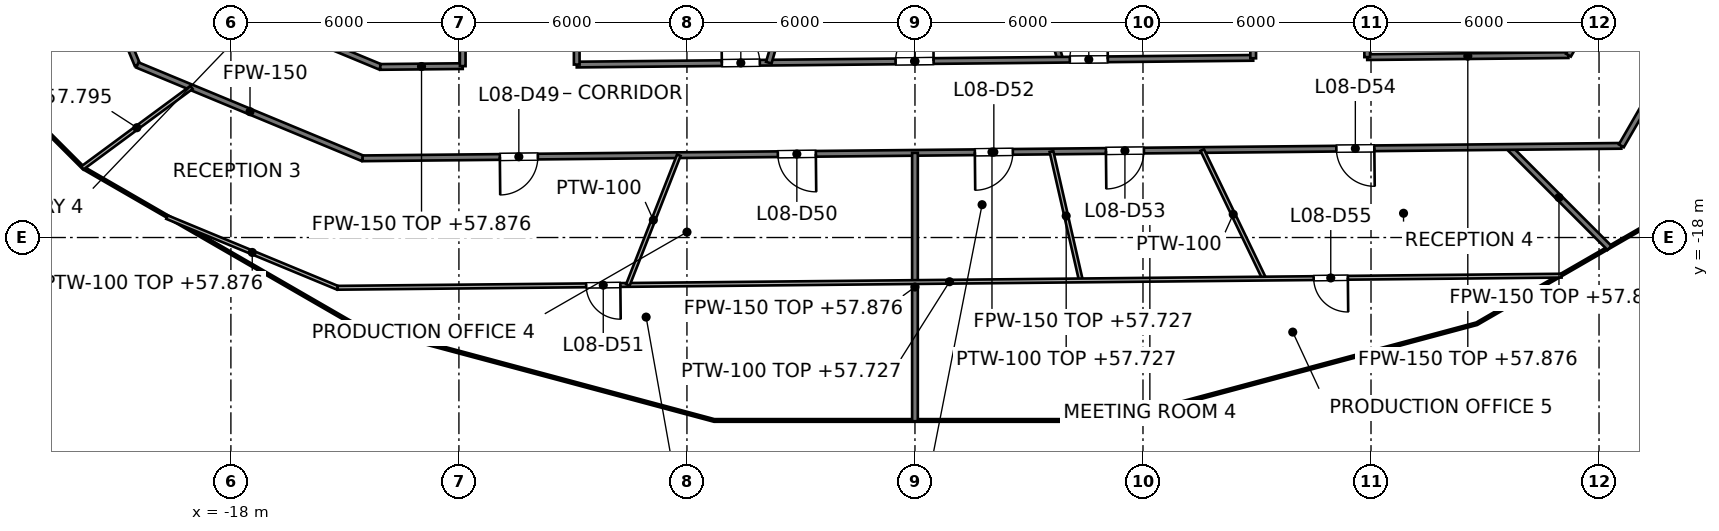
"""IFC4 building model, lengths in metres.
Left out: names, types, materials, properties, quantities, classifications, styles, units other than length and angle.
Written with IfcOpenShell. Run it as: python <this file> out.ifc"""

import sys

from ifc_helpers import new_model, si_unit, direction, frame, frame_2d, origin, place, context, subcontext, project, spatial, rectangle, extrude, element, fill, save


model = new_model("IFC4")
c1 = context("Model", 3, precision=1e-05, world=origin(), true_north=direction((0.0, 1.0)))
c2 = subcontext(c1, "Body", "Model", "MODEL_VIEW")
j1 = project(units=[si_unit("LENGTHUNIT", "METRE"), si_unit("PLANEANGLEUNIT", "RADIAN")], contexts=[c1])
p1 = place(None, origin())
s1 = spatial("IfcSite", under=j1, at=p1, CompositionType="ELEMENT")
p2 = place(p1, origin())
s2 = spatial("IfcBuilding", under=s1, at=p2, CompositionType="ELEMENT")
p3 = place(p2, frame((0.0, 0.0, 54.6)))
s3 = spatial("IfcBuildingStorey", under=s2, at=p3, CompositionType="ELEMENT", Elevation=54.6)
p4 = place(p3, frame((2.296, -8.0, 0.0), z_axis=(0.0, 0.0, 1.0), x_axis=(0.275935525478, -0.961176147113, 0.0)))
e1 = element("IfcWall", 1, at=p4, inside=s3, PredefinedType="PARTITIONING", context=c2, shape_type="SweptSolid", body=[
    extrude(rectangle(XDim=5.548, YDim=0.15, at=frame_2d((2.774, 0.0))), origin(), (0.0, 0.0, 1.0), 4.05),
])
p5 = place(p3, frame((-22.9, -7.572, 0.0), z_axis=(0.0, 0.0, 1.0), x_axis=(0.382860357704, -0.923806227788, 0.0)))
e2 = element("IfcWall", 2, at=p5, inside=s3, PredefinedType="PARTITIONING", context=c2, shape_type="SweptSolid", body=[
    extrude(rectangle(XDim=6.374, YDim=0.15, at=frame_2d((3.187, 0.0))), origin(), (0.0, 0.0, 1.0), 3.276),
])
p6 = place(p5, frame((2.637, 0.0, 0.0)))
e3 = element("IfcOpeningElement", 3, at=p6, cuts=e2, PredefinedType="OPENING", context=c2, shape_type="SweptSolid", body=[
    extrude(rectangle(XDim=1.0, YDim=2.1, at=frame_2d((0.5, 1.05))), frame((0.0, 0.075, 0.0), z_axis=(0.0, -1.0, 0.0), x_axis=(1.0, 0.0, 0.0)), (0.0, 0.0, 1.0), 0.15),
])
p7 = place(p3, frame((15.617, -15.617, 0.0), z_axis=(0.0, 0.0, 1.0), x_axis=(0.707106781187, -0.707106781187, 0.0)))
e4 = element("IfcWall", 4, at=p7, inside=s3, PredefinedType="PARTITIONING", context=c2, shape_type="SweptSolid", body=[
    extrude(rectangle(XDim=3.759, YDim=0.15, at=frame_2d((1.879, 0.0))), origin(), (0.0, 0.0, 1.0), 3.276),
])
p8 = place(p3, frame((-20.46, -13.46, 0.0), z_axis=(0.0, 0.0, 1.0), x_axis=(0.9237825057, -0.382917591869, 0.0)))
e5 = element("IfcWall", 5, at=p8, inside=s3, PredefinedType="PARTITIONING", context=c2, shape_type="SweptSolid", body=[
    extrude(rectangle(XDim=6.415, YDim=0.15, at=frame_2d((3.208, 0.0))), origin(), (0.0, 0.0, 1.0), 3.195),
])
p9 = place(p3, frame((-18.623, -11.623, 0.0), z_axis=(0.0, 0.0, 1.0), x_axis=(0.923791670587, -0.38289548098, 0.0)))
e6 = element("IfcWall", 6, at=p9, inside=s3, PredefinedType="PARTITIONING", context=c2, shape_type="SweptSolid", body=[
    extrude(rectangle(XDim=4.931, YDim=0.15, at=frame_2d((2.465, 0.0))), origin(), (0.0, 0.0, 1.0), 3.195),
])
p10 = place(p3, frame((-14.534, -15.916, 0.0), z_axis=(0.0, 0.0, 1.0), x_axis=(0.99995085722, 0.009913785652, 0.0)))
e7 = element("IfcWall", 7, at=p10, inside=s3, PredefinedType="PARTITIONING", context=c2, shape_type="SweptSolid", body=[
    extrude(rectangle(XDim=33.123, YDim=0.15, at=frame_2d((16.561, 0.0))), origin(), (0.0, 0.0, 1.0), 3.127),
])
p11 = place(p10, frame((3.611, 0.0, 0.0)))
e8 = element("IfcOpeningElement", 8, at=p11, cuts=e7, PredefinedType="OPENING", context=c2, shape_type="SweptSolid", body=[
    extrude(rectangle(XDim=1.0, YDim=2.1, at=frame_2d((0.5, 1.05))), frame((0.0, 0.075, 0.0), z_axis=(0.0, -1.0, 0.0), x_axis=(1.0, 0.0, 0.0)), (0.0, 0.0, 1.0), 0.15),
])
p12 = place(p10, frame((10.927, 0.0, 0.0)))
e9 = element("IfcOpeningElement", 9, at=p12, cuts=e7, PredefinedType="OPENING", context=c2, shape_type="SweptSolid", body=[
    extrude(rectangle(XDim=1.0, YDim=2.1, at=frame_2d((0.5, 1.05))), frame((0.0, 0.075, 0.0), z_axis=(0.0, -1.0, 0.0), x_axis=(1.0, 0.0, 0.0)), (0.0, 0.0, 1.0), 0.15),
])
p13 = place(p10, frame((16.11, 0.0, 0.0)))
e10 = element("IfcOpeningElement", 10, at=p13, cuts=e7, PredefinedType="OPENING", context=c2, shape_type="SweptSolid", body=[
    extrude(rectangle(XDim=1.0, YDim=2.1, at=frame_2d((0.5, 1.05))), frame((0.0, 0.075, 0.0), z_axis=(0.0, -1.0, 0.0), x_axis=(1.0, 0.0, 0.0)), (0.0, 0.0, 1.0), 0.15),
])
p14 = place(p10, frame((19.56, 0.0, 0.0)))
e11 = element("IfcOpeningElement", 11, at=p14, cuts=e7, PredefinedType="OPENING", context=c2, shape_type="SweptSolid", body=[
    extrude(rectangle(XDim=1.0, YDim=2.1, at=frame_2d((0.5, 1.05))), frame((0.0, 0.075, 0.0), z_axis=(0.0, -1.0, 0.0), x_axis=(1.0, 0.0, 0.0)), (0.0, 0.0, 1.0), 0.15),
])
p15 = place(p10, frame((25.623, 0.0, 0.0)))
e12 = element("IfcOpeningElement", 12, at=p15, cuts=e7, PredefinedType="OPENING", context=c2, shape_type="SweptSolid", body=[
    extrude(rectangle(XDim=1.0, YDim=2.1, at=frame_2d((0.5, 1.05))), frame((0.0, 0.075, 0.0), z_axis=(0.0, -1.0, 0.0), x_axis=(1.0, 0.0, 0.0)), (0.0, 0.0, 1.0), 0.15),
])
p16 = place(p3, frame((-14.068, -13.511, 0.0), z_axis=(0.0, 0.0, 1.0), x_axis=(0.999950911515, 0.009908307647, 0.0)))
e13 = element("IfcWall", 13, at=p16, inside=s3, PredefinedType="PARTITIONING", context=c2, shape_type="SweptSolid", body=[
    extrude(rectangle(XDim=2.168, YDim=0.15, at=frame_2d((1.084, 0.0))), origin(), (0.0, 0.0, 1.0), 3.276),
])
p17 = place(p3, frame((-8.9, -13.449, 0.0), z_axis=(0.0, 0.0, 1.0), x_axis=(0.999950834077, 0.009916119672, 0.0)))
e14 = element("IfcWall", 14, at=p17, inside=s3, PredefinedType="PARTITIONING", context=c2, shape_type="SweptSolid", body=[
    extrude(rectangle(XDim=17.801, YDim=0.15, at=frame_2d((8.9, 0.0))), origin(), (0.0, 0.0, 1.0), 3.127),
])
p18 = place(p17, frame((3.818, 0.0, 0.0)))
e15 = element("IfcOpeningElement", 15, at=p18, cuts=e14, PredefinedType="OPENING", context=c2, shape_type="SweptSolid", body=[
    extrude(rectangle(XDim=1.0, YDim=2.1, at=frame_2d((0.5, 1.05))), frame((0.0, 0.075, 0.0), z_axis=(0.0, -1.0, 0.0), x_axis=(1.0, 0.0, 0.0)), (0.0, 0.0, 1.0), 0.15),
])
p19 = place(p17, frame((8.391, 0.0, 0.0)))
e16 = element("IfcOpeningElement", 16, at=p19, cuts=e14, PredefinedType="OPENING", context=c2, shape_type="SweptSolid", body=[
    extrude(rectangle(XDim=1.0, YDim=2.1, at=frame_2d((0.5, 1.05))), frame((0.0, 0.075, 0.0), z_axis=(0.0, -1.0, 0.0), x_axis=(1.0, 0.0, 0.0)), (0.0, 0.0, 1.0), 0.15),
])
p20 = place(p17, frame((12.975, 0.0, 0.0)))
e17 = element("IfcOpeningElement", 17, at=p20, cuts=e14, PredefinedType="OPENING", context=c2, shape_type="SweptSolid", body=[
    extrude(rectangle(XDim=1.0, YDim=2.1, at=frame_2d((0.5, 1.05))), frame((0.0, 0.075, 0.0), z_axis=(0.0, -1.0, 0.0), x_axis=(1.0, 0.0, 0.0)), (0.0, 0.0, 1.0), 0.15),
])
p21 = place(p3, frame((11.9, -13.253, 0.0), z_axis=(0.0, 0.0, 1.0), x_axis=(0.999950853109, 0.009914200296, 0.0)))
e18 = element("IfcWall", 18, at=p21, inside=s3, PredefinedType="PARTITIONING", context=c2, shape_type="SweptSolid", body=[
    extrude(rectangle(XDim=5.294, YDim=0.15, at=frame_2d((2.647, 0.0))), origin(), (0.0, 0.0, 1.0), 3.276),
])
p22 = place(p3, frame((18.587, -15.587, 0.0), z_axis=(0.0, 0.0, 1.0), x_axis=(0.500026433136, 0.866010142069, 0.0)))
e19 = element("IfcWall", 19, at=p22, inside=s3, PredefinedType="PARTITIONING", context=c2, shape_type="SweptSolid", body=[
    extrude(rectangle(XDim=8.713, YDim=0.15, at=frame_2d((4.357, 0.0))), origin(), (0.0, 0.0, 1.0), 3.195),
])
p23 = place(p22, frame((3.125, 0.0, 0.0)))
e20 = element("IfcOpeningElement", 20, at=p23, cuts=e19, PredefinedType="OPENING", context=c2, shape_type="SweptSolid", body=[
    extrude(rectangle(XDim=1.0, YDim=2.1, at=frame_2d((0.5, 1.05))), frame((0.0, 0.075, 0.0), z_axis=(0.0, -1.0, 0.0), x_axis=(1.0, 0.0, 0.0)), (0.0, 0.0, 1.0), 0.15),
])
p24 = place(p3, frame((17.194, -13.201, 0.0), z_axis=(0.0, 0.0, 1.0), x_axis=(0.50001062018, 0.866019272134, 0.0)))
e21 = element("IfcWall", 21, at=p24, inside=s3, PredefinedType="PARTITIONING", context=c2, shape_type="SweptSolid", body=[
    extrude(rectangle(XDim=6.674, YDim=0.15, at=frame_2d((3.337, 0.0))), origin(), (0.0, 0.0, 1.0), 3.195),
])
p25 = place(p24, frame((2.833, 0.0, 0.0)))
e22 = element("IfcOpeningElement", 22, at=p25, cuts=e21, PredefinedType="OPENING", context=c2, shape_type="SweptSolid", body=[
    extrude(rectangle(XDim=1.0, YDim=2.1, at=frame_2d((0.5, 1.05))), frame((0.0, 0.075, 0.0), z_axis=(0.0, -1.0, 0.0), x_axis=(1.0, 0.0, 0.0)), (0.0, 0.0, 1.0), 0.15),
])
p26 = place(p3, frame((-3.846, -13.399, 0.0), z_axis=(0.0, 0.0, 1.0), x_axis=(0.275914969745, 0.961182048038, 0.0)))
e23 = element("IfcWall", 23, at=p26, inside=s3, PredefinedType="PARTITIONING", context=c2, shape_type="SweptSolid", body=[
    extrude(rectangle(XDim=5.617, YDim=0.15, at=frame_2d((2.809, 0.0))), origin(), (0.0, 0.0, 1.0), 4.05),
])
p27 = place(p3, frame((11.9, -13.253, 0.0), z_axis=(0.0, 0.0, 1.0), x_axis=(0.0, 1.0, 0.0)))
e24 = element("IfcWall", 24, at=p27, inside=s3, PredefinedType="PARTITIONING", context=c2, shape_type="SweptSolid", body=[
    extrude(rectangle(XDim=5.253, YDim=0.15, at=frame_2d((2.626, 0.0))), origin(), (0.0, 0.0, 1.0), 3.195),
])
p28 = place(p3, frame((8.9, -13.283, 0.0), z_axis=(0.0, 0.0, 1.0), x_axis=(0.0, 1.0, 0.0)))
e25 = element("IfcWall", 25, at=p28, inside=s3, PredefinedType="PARTITIONING", context=c2, shape_type="SweptSolid", body=[
    extrude(rectangle(XDim=5.283, YDim=0.15, at=frame_2d((2.642, 0.0))), origin(), (0.0, 0.0, 1.0), 3.127),
])
p29 = place(p3, frame((0.0, -22.834, 0.0), z_axis=(0.0, 0.0, 1.0), x_axis=(0.0, 1.0, 0.0)))
e26 = element("IfcWall", 26, at=p29, inside=s3, PredefinedType="PARTITIONING", context=c2, shape_type="SweptSolid", body=[
    extrude(rectangle(XDim=7.062, YDim=0.15, at=frame_2d((3.531, 0.0))), origin(), (0.0, 0.0, 1.0), 3.276),
])
p30 = place(p3, frame((-8.9, -13.449, 0.0), z_axis=(0.0, 0.0, 1.0), x_axis=(0.0, 1.0, 0.0)))
e27 = element("IfcWall", 27, at=p30, inside=s3, PredefinedType="PARTITIONING", context=c2, shape_type="SweptSolid", body=[
    extrude(rectangle(XDim=5.449, YDim=0.15, at=frame_2d((2.725, 0.0))), origin(), (0.0, 0.0, 1.0), 3.127),
])
p31 = place(p3, frame((-11.9, -13.49, 0.0), z_axis=(0.0, 0.0, 1.0), x_axis=(0.0, 1.0, 0.0)))
e28 = element("IfcWall", 28, at=p31, inside=s3, PredefinedType="PARTITIONING", context=c2, shape_type="SweptSolid", body=[
    extrude(rectangle(XDim=5.49, YDim=0.15, at=frame_2d((2.745, 0.0))), origin(), (0.0, 0.0, 1.0), 3.195),
])
p32 = place(p31, frame((2.245, 0.0, 0.0)))
e29 = element("IfcOpeningElement", 29, at=p32, cuts=e28, PredefinedType="OPENING", context=c2, shape_type="SweptSolid", body=[
    extrude(rectangle(XDim=1.0, YDim=2.1, at=frame_2d((0.5, 1.05))), frame((0.0, 0.075, 0.0), z_axis=(0.0, -1.0, 0.0), x_axis=(1.0, 0.0, 0.0)), (0.0, 0.0, 1.0), 0.15),
])
p33 = place(p3, frame((3.592, -15.736, 0.0), z_axis=(0.0, 0.0, 1.0), x_axis=(0.22239426517, -0.974956814848, 0.0)))
e30 = element("IfcWall", 30, at=p33, inside=s3, PredefinedType="PARTITIONING", context=c2, shape_type="SweptSolid", body=[
    extrude(rectangle(XDim=3.48, YDim=0.1, at=frame_2d((1.74, 0.0))), origin(), (0.0, 0.0, 1.0), 3.127),
])
p34 = place(p3, frame((7.559, -15.697, 0.0), z_axis=(0.0, 0.0, 1.0), x_axis=(0.433930919044, -0.900946145726, 0.0)))
e31 = element("IfcWall", 31, at=p34, inside=s3, PredefinedType="PARTITIONING", context=c2, shape_type="SweptSolid", body=[
    extrude(rectangle(XDim=3.756, YDim=0.1, at=frame_2d((1.878, 0.0))), origin(), (0.0, 0.0, 1.0), 4.05),
])
p35 = place(p3, frame((-19.682, -17.463, 0.0), z_axis=(0.0, 0.0, 1.0), x_axis=(0.923791978335, -0.382894738491, 0.0)))
e32 = element("IfcWall", 32, at=p35, inside=s3, PredefinedType="PARTITIONING", context=c2, shape_type="SweptSolid", body=[
    extrude(rectangle(XDim=4.858, YDim=0.1, at=frame_2d((2.429, 0.0))), origin(), (0.0, 0.0, 1.0), 3.276),
])
p36 = place(p3, frame((-15.194, -19.323, 0.0), z_axis=(0.0, 0.0, 1.0), x_axis=(0.999950927115, 0.009906733132, 0.0)))
e33 = element("IfcWall", 33, at=p36, inside=s3, PredefinedType="PARTITIONING", context=c2, shape_type="SweptSolid", body=[
    extrude(rectangle(XDim=32.209, YDim=0.1, at=frame_2d((16.105, 0.0))), origin(), (0.0, 0.0, 1.0), 3.127),
])
p37 = place(p36, frame((6.542, 0.0, 0.0)))
e34 = element("IfcOpeningElement", 34, at=p37, cuts=e33, PredefinedType="OPENING", context=c2, shape_type="SweptSolid", body=[
    extrude(rectangle(XDim=0.9, YDim=2.1, at=frame_2d((0.45, 1.05))), frame((0.0, 0.05, 0.0), z_axis=(0.0, -1.0, 0.0), x_axis=(1.0, 0.0, 0.0)), (0.0, 0.0, 1.0), 0.1),
])
p38 = place(p36, frame((25.686, 0.0, 0.0)))
e35 = element("IfcOpeningElement", 35, at=p38, cuts=e33, PredefinedType="OPENING", context=c2, shape_type="SweptSolid", body=[
    extrude(rectangle(XDim=0.9, YDim=2.1, at=frame_2d((0.45, 1.05))), frame((0.0, 0.05, 0.0), z_axis=(0.0, -1.0, 0.0), x_axis=(1.0, 0.0, 0.0)), (0.0, 0.0, 1.0), 0.1),
])
p39 = place(p3, frame((-21.91, -16.17, 0.0), z_axis=(0.0, 0.0, 1.0), x_axis=(0.804644864384, 0.593756382888, 0.0)))
e36 = element("IfcWall", 36, at=p39, inside=s3, PredefinedType="PARTITIONING", context=c2, shape_type="SweptSolid", body=[
    extrude(rectangle(XDim=3.57, YDim=0.1, at=frame_2d((1.785, 0.0))), origin(), (0.0, 0.0, 1.0), 3.195),
])
p40 = place(p3, frame((-7.554, -19.247, 0.0), z_axis=(0.0, 0.0, 1.0), x_axis=(0.365413393444, 0.930845342628, 0.0)))
e37 = element("IfcWall", 37, at=p40, inside=s3, PredefinedType="PARTITIONING", context=c2, shape_type="SweptSolid", body=[
    extrude(rectangle(XDim=3.667, YDim=0.1, at=frame_2d((1.833, 0.0))), origin(), (0.0, 0.0, 1.0), 4.05),
])
p41 = place(p18, origin())
e38 = element("IfcDoor", 38, at=p41, inside=s3, OperationType="SINGLE_SWING_LEFT", PredefinedType="DOOR", context=c2, shape_type="SweptSolid", body=[
    extrude(rectangle(XDim=1.0, YDim=2.1, at=frame_2d((0.5, 1.05))), frame((0.0, 0.025, 0.0), z_axis=(0.0, -1.0, 0.0), x_axis=(1.0, 0.0, 0.0)), (0.0, 0.0, 1.0), 0.05),
])
fill(e15, e38)
p42 = place(p19, origin())
e39 = element("IfcDoor", 39, at=p42, inside=s3, OperationType="SINGLE_SWING_RIGHT", PredefinedType="DOOR", context=c2, shape_type="SweptSolid", body=[
    extrude(rectangle(XDim=1.0, YDim=2.1, at=frame_2d((0.5, 1.05))), frame((0.0, 0.025, 0.0), z_axis=(0.0, -1.0, 0.0), x_axis=(1.0, 0.0, 0.0)), (0.0, 0.0, 1.0), 0.05),
])
fill(e16, e39)
p43 = place(p20, origin())
e40 = element("IfcDoor", 40, at=p43, inside=s3, OperationType="SINGLE_SWING_RIGHT", PredefinedType="DOOR", context=c2, shape_type="SweptSolid", body=[
    extrude(rectangle(XDim=1.0, YDim=2.1, at=frame_2d((0.5, 1.05))), frame((0.0, 0.025, 0.0), z_axis=(0.0, -1.0, 0.0), x_axis=(1.0, 0.0, 0.0)), (0.0, 0.0, 1.0), 0.05),
])
fill(e17, e40)
p44 = place(p11, origin())
e41 = element("IfcDoor", 41, at=p44, inside=s3, OperationType="SINGLE_SWING_LEFT", PredefinedType="DOOR", context=c2, shape_type="SweptSolid", body=[
    extrude(rectangle(XDim=1.0, YDim=2.1, at=frame_2d((0.5, 1.05))), frame((0.0, 0.025, 0.0), z_axis=(0.0, -1.0, 0.0), x_axis=(1.0, 0.0, 0.0)), (0.0, 0.0, 1.0), 0.05),
])
fill(e8, e41)
p45 = place(p12, origin())
e42 = element("IfcDoor", 42, at=p45, inside=s3, OperationType="SINGLE_SWING_RIGHT", PredefinedType="DOOR", context=c2, shape_type="SweptSolid", body=[
    extrude(rectangle(XDim=1.0, YDim=2.1, at=frame_2d((0.5, 1.05))), frame((0.0, 0.025, 0.0), z_axis=(0.0, -1.0, 0.0), x_axis=(1.0, 0.0, 0.0)), (0.0, 0.0, 1.0), 0.05),
])
fill(e9, e42)
p46 = place(p37, origin())
e43 = element("IfcDoor", 43, at=p46, inside=s3, OperationType="SINGLE_SWING_RIGHT", PredefinedType="DOOR", context=c2, shape_type="SweptSolid", body=[
    extrude(rectangle(XDim=0.9, YDim=2.1, at=frame_2d((0.45, 1.05))), frame((0.0, 0.025, 0.0), z_axis=(0.0, -1.0, 0.0), x_axis=(1.0, 0.0, 0.0)), (0.0, 0.0, 1.0), 0.05),
])
fill(e34, e43)
p47 = place(p13, origin())
e44 = element("IfcDoor", 44, at=p47, inside=s3, OperationType="SINGLE_SWING_LEFT", PredefinedType="DOOR", context=c2, shape_type="SweptSolid", body=[
    extrude(rectangle(XDim=1.0, YDim=2.1, at=frame_2d((0.5, 1.05))), frame((0.0, 0.025, 0.0), z_axis=(0.0, -1.0, 0.0), x_axis=(1.0, 0.0, 0.0)), (0.0, 0.0, 1.0), 0.05),
])
fill(e10, e44)
p48 = place(p14, origin())
e45 = element("IfcDoor", 45, at=p48, inside=s3, OperationType="SINGLE_SWING_LEFT", PredefinedType="DOOR", context=c2, shape_type="SweptSolid", body=[
    extrude(rectangle(XDim=1.0, YDim=2.1, at=frame_2d((0.5, 1.05))), frame((0.0, 0.025, 0.0), z_axis=(0.0, -1.0, 0.0), x_axis=(1.0, 0.0, 0.0)), (0.0, 0.0, 1.0), 0.05),
])
fill(e11, e45)
p49 = place(p15, origin())
e46 = element("IfcDoor", 46, at=p49, inside=s3, OperationType="SINGLE_SWING_RIGHT", PredefinedType="DOOR", context=c2, shape_type="SweptSolid", body=[
    extrude(rectangle(XDim=1.0, YDim=2.1, at=frame_2d((0.5, 1.05))), frame((0.0, 0.025, 0.0), z_axis=(0.0, -1.0, 0.0), x_axis=(1.0, 0.0, 0.0)), (0.0, 0.0, 1.0), 0.05),
])
fill(e12, e46)
p50 = place(p38, origin())
e47 = element("IfcDoor", 47, at=p50, inside=s3, OperationType="SINGLE_SWING_RIGHT", PredefinedType="DOOR", context=c2, shape_type="SweptSolid", body=[
    extrude(rectangle(XDim=0.9, YDim=2.1, at=frame_2d((0.45, 1.05))), frame((0.0, 0.025, 0.0), z_axis=(0.0, -1.0, 0.0), x_axis=(1.0, 0.0, 0.0)), (0.0, 0.0, 1.0), 0.05),
])
fill(e35, e47)
save(model, sys.argv[1])
